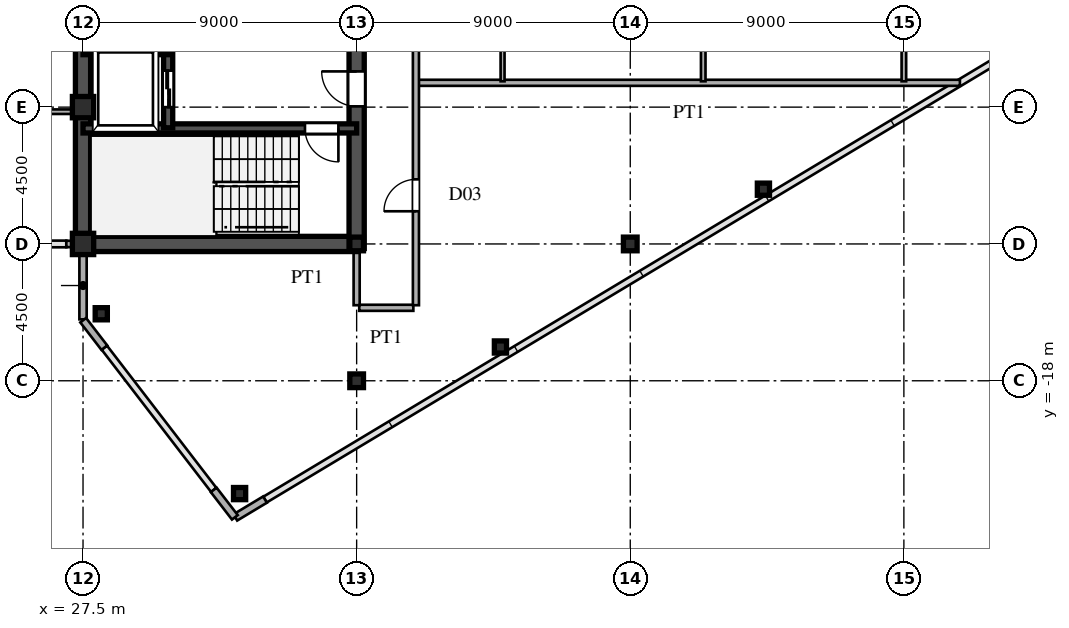
"""IFC4 building model, lengths in metres.
Left out: names, types, materials, properties, quantities, classifications, styles, units other than length and angle.
Written with IfcOpenShell. Run it as: python <this file> out.ifc"""

import sys

from ifc_helpers import new_model, si_unit, direction, frame, frame_2d, origin, origin_2d, place, context, subcontext, project, spatial, rectangle, hollow_rectangle, i_section, extrude, source, transform, mapped, element, fill, save


model = new_model("IFC4")
c1 = context("Model", 3, precision=1e-05, world=origin(), true_north=direction((0.0, 1.0)))
c2 = subcontext(c1, "Body", "Model", "MODEL_VIEW")
j1 = project(units=[si_unit("LENGTHUNIT", "METRE"), si_unit("PLANEANGLEUNIT", "RADIAN")], contexts=[c1])
p1 = place(None, origin())
s1 = spatial("IfcSite", under=j1, at=p1, CompositionType="ELEMENT")
p2 = place(p1, origin())
s2 = spatial("IfcBuilding", under=s1, at=p2, CompositionType="ELEMENT")
p3 = place(p2, frame((0.0, 0.0, 250.65)))
s3 = spatial("IfcBuildingStorey", under=s2, at=p3, CompositionType="ELEMENT", Elevation=250.65)
m1 = source(origin(), c2, "Body", "SweptSolid", [
    extrude(hollow_rectangle(XDim=0.7, YDim=0.7, WallThickness=0.03, at=origin_2d()), origin(), (0.0, 0.0, 1.0), 3.75),
])
for number, where, z_axis, x_axis in (
    (1, (27.5, -13.5, 0.0), (0.0, 0.0, 1.0), (1.0, 0.0, 0.0)),
    (2, (27.5, -9.0, 0.0), (0.0, 0.0, 1.0), (1.0, 0.0, 0.0)),
):
    element("IfcColumn", number, at=place(p3, frame(where, z_axis=z_axis, x_axis=x_axis)), inside=s3, PredefinedType="COLUMN", context=c2, shape_type="MappedRepresentation", body=[
        mapped(m1, transform((0.0, 0.0, 0.0), scale=1.0)),
    ])
m2 = source(origin(), c2, "Body", "SweptSolid", [
    extrude(i_section(OverallWidth=0.45, OverallDepth=0.45, WebThickness=0.016, FlangeThickness=0.025, at=origin_2d()), origin(), (0.0, 0.0, 1.0), 3.75),
])
for number, where, z_axis, x_axis in (
    (3, (36.5, -18.0, 0.0), (0.0, 0.0, 1.0), (1.0, 0.0, 0.0)),
    (4, (36.5, -13.5, 0.0), (0.0, 0.0, 1.0), (1.0, 0.0, 0.0)),
    (5, (45.5, -13.5, 0.0), (0.0, 0.0, 1.0), (1.0, 0.0, 0.0)),
):
    element("IfcColumn", number, at=place(p3, frame(where, z_axis=z_axis, x_axis=x_axis)), inside=s3, PredefinedType="COLUMN", context=c2, shape_type="MappedRepresentation", body=[
        mapped(m2, transform((0.0, 0.0, 0.0), scale=1.0)),
    ])
m3 = source(origin(), c2, "Body", "SweptSolid", [
    extrude(hollow_rectangle(XDim=0.4, YDim=0.4, WallThickness=0.016, at=origin_2d()), origin(), (0.0, 0.0, 1.0), 3.75),
])
for number, where, z_axis, x_axis in (
    (6, (32.65, -21.71, 0.0), (0.0, 0.0, 1.0), (1.0, 0.0, 0.0)),
    (7, (28.1, -15.796, 0.0), (0.0, 0.0, 1.0), (1.0, 0.0, 0.0)),
    (8, (41.23, -16.889, 0.0), (0.0, 0.0, 1.0), (1.0, 0.0, 0.0)),
    (9, (49.88, -11.699, 0.0), (0.0, 0.0, 1.0), (1.0, 0.0, 0.0)),
):
    element("IfcColumn", number, at=place(p3, frame(where, z_axis=z_axis, x_axis=x_axis)), inside=s3, PredefinedType="COLUMN", context=c2, shape_type="MappedRepresentation", body=[
        mapped(m3, transform((0.0, 0.0, 0.0), scale=1.0)),
    ])
p4 = place(p3, frame((32.509, -22.495, 0.0), z_axis=(0.0, 0.0, 1.0), x_axis=(0.85743623509, 0.514590228002, 0.0)))
e10 = element("IfcWall", 10, at=p4, inside=s3, PredefinedType="SOLIDWALL", context=c2, shape_type="SweptSolid", body=[
    extrude(rectangle(XDim=1.14, YDim=0.24, at=frame_2d((0.57, 0.0))), origin(), (0.0, 0.0, 1.0), 3.53),
])
p5 = place(p3, frame((27.5, -15.98, 0.0), z_axis=(0.0, 0.0, 1.0), x_axis=(0.0, 1.0, 0.0)))
e11 = element("IfcWall", 11, at=p5, inside=s3, PredefinedType="SOLIDWALL", context=c2, shape_type="SweptSolid", body=[
    extrude(rectangle(XDim=1.605, YDim=0.24, at=frame_2d((0.803, 0.0))), origin(), (0.0, 0.0, 1.0), 3.53),
])
p6 = place(p3, frame((27.5, -14.375, 0.0), z_axis=(0.0, 0.0, 1.0), x_axis=(0.0, 1.0, 0.0)))
e12 = element("IfcWall", 12, at=p6, inside=s3, PredefinedType="SOLIDWALL", context=c2, shape_type="SweptSolid", body=[
    extrude(rectangle(XDim=0.62, YDim=0.24, at=frame_2d((0.31, 0.0))), origin(), (0.0, 0.0, 1.0), 3.03),
])
for number, where, z_axis, x_axis in (
    (13, (27.506, -16.008, 0.0), (0.0, 0.0, 1.0), (0.61, -0.793, 0.0)),
    (14, (31.799, -21.588, 0.0), (0.0, 0.0, 1.0), (0.61, -0.793, 0.0)),
):
    element("IfcWall", number, at=place(p3, frame(where, z_axis=z_axis, x_axis=x_axis)), inside=s3, PredefinedType="SOLIDWALL", context=c2, shape_type="SweptSolid", body=[
        extrude(rectangle(XDim=1.14, YDim=0.24, at=frame_2d((0.57, 0.0))), origin(), (0.0, 0.0, 1.0), 3.53),
    ])
p7 = place(p3, frame((26.95, -13.5, 0.0), z_axis=(0.0, 0.0, 1.0), x_axis=(1.0, 0.0, 0.0)))
e15 = element("IfcWall", 15, at=p7, inside=s3, PredefinedType="SOLIDWALL", context=c2, shape_type="SweptSolid", body=[
    extrude(rectangle(XDim=0.54, YDim=0.21, at=frame_2d((0.27, 0.0))), origin(), (0.0, 0.0, 1.0), 3.03),
])
p8 = place(p3, frame((27.5, -13.5, 0.0), z_axis=(0.0, 0.0, 1.0), x_axis=(0.0, 1.0, 0.0)))
e16 = element("IfcWall", 16, at=p8, inside=s3, PredefinedType="SHEAR", context=c2, shape_type="SweptSolid", body=[
    extrude(rectangle(XDim=12.2, YDim=0.5, at=frame_2d((6.1, 0.0))), origin(), (0.0, 0.0, 1.0), 3.53),
])
p9 = place(p3, frame((27.5, -13.5, 0.0), z_axis=(0.0, 0.0, 1.0), x_axis=(1.0, 0.0, 0.0)))
e17 = element("IfcWall", 17, at=p9, inside=s3, PredefinedType="SHEAR", context=c2, shape_type="SweptSolid", body=[
    extrude(rectangle(XDim=9.0, YDim=0.5, at=frame_2d((4.5, 0.0))), origin(), (0.0, 0.0, 1.0), 3.53),
])
p10 = place(p3, frame((36.5, -13.65, 0.0), z_axis=(0.0, 0.0, 1.0), x_axis=(0.0, 1.0, 0.0)))
e18 = element("IfcWall", 18, at=p10, inside=s3, PredefinedType="SHEAR", context=c2, shape_type="SweptSolid", body=[
    extrude(rectangle(XDim=7.15, YDim=0.5, at=frame_2d((3.575, 0.0))), origin(), (0.0, 0.0, 1.0), 3.53),
])
p11 = place(p10, frame((4.675, 0.0, 0.0)))
e19 = element("IfcOpeningElement", 19, at=p11, cuts=e18, PredefinedType="OPENING", context=c2, shape_type="SweptSolid", body=[
    extrude(rectangle(XDim=1.15, YDim=2.2, at=frame_2d((0.575, 1.1))), frame((0.0, 0.26, 0.0), z_axis=(0.0, -1.0, 0.0), x_axis=(1.0, 0.0, 0.0)), (0.0, 0.0, 1.0), 0.52),
])
p12 = place(p3, frame((27.5, -9.7, 0.0), z_axis=(0.0, 0.0, 1.0), x_axis=(1.0, 0.0, 0.0)))
e20 = element("IfcWall", 20, at=p12, inside=s3, PredefinedType="SHEAR", context=c2, shape_type="SweptSolid", body=[
    extrude(rectangle(XDim=9.0, YDim=0.3, at=frame_2d((4.5, 0.0))), origin(), (0.0, 0.0, 1.0), 3.53),
])
p13 = place(p12, frame((7.3, 0.0, 0.0)))
e21 = element("IfcOpeningElement", 21, at=p13, cuts=e20, PredefinedType="OPENING", context=c2, shape_type="SweptSolid", body=[
    extrude(rectangle(XDim=1.1, YDim=2.2, at=frame_2d((0.55, 1.1))), frame((0.0, 0.16, 0.0), z_axis=(0.0, -1.0, 0.0), x_axis=(1.0, 0.0, 0.0)), (0.0, 0.0, 1.0), 0.32),
])
p14 = place(p3, frame((27.5, -7.15, 0.0), z_axis=(0.0, 0.0, 1.0), x_axis=(1.0, 0.0, 0.0)))
e22 = element("IfcWall", 22, at=p14, inside=s3, PredefinedType="SHEAR", context=c2, shape_type="SweptSolid", body=[
    extrude(rectangle(XDim=2.8, YDim=0.25, at=frame_2d((1.4, 0.0))), origin(), (0.0, 0.0, 1.0), 3.53),
])
p15 = place(p3, frame((30.3, -9.68, 0.0), z_axis=(0.0, 0.0, 1.0), x_axis=(0.0, 1.0, 0.0)))
e23 = element("IfcWall", 23, at=p15, inside=s3, PredefinedType="SHEAR", context=c2, shape_type="SweptSolid", body=[
    extrude(rectangle(XDim=2.56, YDim=0.3, at=frame_2d((1.28, 0.0))), origin(), (0.0, 0.0, 1.0), 3.53),
])
p16 = place(p15, frame((0.68, 0.0, 0.0)))
e24 = element("IfcOpeningElement", 24, at=p16, cuts=e23, PredefinedType="OPENING", context=c2, shape_type="SweptSolid", body=[
    extrude(rectangle(XDim=1.2, YDim=2.25, at=frame_2d((0.6, 1.125))), frame((0.0, 0.16, 0.0), z_axis=(0.0, -1.0, 0.0), x_axis=(1.0, 0.0, 0.0)), (0.0, 0.0, 1.0), 0.32),
])
p17 = place(p3, frame((36.585, -15.6, 0.0), z_axis=(0.0, 0.0, 1.0), x_axis=(1.0, 0.0, 0.0)))
e25 = element("IfcWall", 25, at=p17, inside=s3, PredefinedType="PARTITIONING", context=c2, shape_type="SweptSolid", body=[
    extrude(rectangle(XDim=1.78, YDim=0.2, at=frame_2d((0.89, 0.0))), origin(), (0.0, 0.0, 1.0), 3.53),
])
p18 = place(p3, frame((7.085, -9.15, 0.0), z_axis=(0.0, 0.0, 1.0), x_axis=(1.0, 0.0, 0.0)))
e26 = element("IfcWall", 26, at=p18, inside=s3, PredefinedType="PARTITIONING", context=c2, shape_type="SweptSolid", body=[
    extrude(rectangle(XDim=20.16, YDim=0.15, at=frame_2d((10.08, 0.0))), origin(), (0.0, 0.0, 1.0), 3.53),
])
p19 = place(p18, frame((3.44, 0.0, 0.0)))
e27 = element("IfcOpeningElement", 27, at=p19, cuts=e26, PredefinedType="OPENING", context=c2, shape_type="SweptSolid", body=[
    extrude(rectangle(XDim=0.95, YDim=2.15, at=frame_2d((0.475, 1.075))), frame((0.0, 0.085, 0.0), z_axis=(0.0, -1.0, 0.0), x_axis=(1.0, 0.0, 0.0)), (0.0, 0.0, 1.0), 0.17),
])
p20 = place(p18, frame((10.69, 0.0, 0.0)))
e28 = element("IfcOpeningElement", 28, at=p20, cuts=e26, PredefinedType="OPENING", context=c2, shape_type="SweptSolid", body=[
    extrude(rectangle(XDim=0.95, YDim=2.15, at=frame_2d((0.475, 1.075))), frame((0.0, 0.085, 0.0), z_axis=(0.0, -1.0, 0.0), x_axis=(1.0, 0.0, 0.0)), (0.0, 0.0, 1.0), 0.17),
])
p21 = place(p18, frame((16.94, 0.0, 0.0)))
e29 = element("IfcOpeningElement", 29, at=p21, cuts=e26, PredefinedType="OPENING", context=c2, shape_type="SweptSolid", body=[
    extrude(rectangle(XDim=0.95, YDim=2.15, at=frame_2d((0.475, 1.075))), frame((0.0, 0.085, 0.0), z_axis=(0.0, -1.0, 0.0), x_axis=(1.0, 0.0, 0.0)), (0.0, 0.0, 1.0), 0.17),
])
p22 = place(p3, frame((38.53, -8.2, 0.0), z_axis=(0.0, 0.0, 1.0), x_axis=(1.0, 0.0, 0.0)))
e30 = element("IfcWall", 30, at=p22, inside=s3, PredefinedType="PARTITIONING", context=c2, shape_type="SweptSolid", body=[
    extrude(rectangle(XDim=17.813, YDim=0.2, at=frame_2d((8.906, 0.0))), origin(), (0.0, 0.0, 1.0), 3.53),
])
p23 = place(p3, frame((36.5, -15.515, 0.0), z_axis=(0.0, 0.0, 1.0), x_axis=(0.0, 1.0, 0.0)))
e31 = element("IfcWall", 31, at=p23, inside=s3, PredefinedType="PARTITIONING", context=c2, shape_type="SweptSolid", body=[
    extrude(rectangle(XDim=1.76, YDim=0.2, at=frame_2d((0.88, 0.0))), origin(), (0.0, 0.0, 1.0), 2.93),
])
p24 = place(p3, frame((38.45, -15.515, 0.0), z_axis=(0.0, 0.0, 1.0), x_axis=(0.0, 1.0, 0.0)))
e32 = element("IfcWall", 32, at=p24, inside=s3, PredefinedType="PARTITIONING", context=c2, shape_type="SweptSolid", body=[
    extrude(rectangle(XDim=31.03, YDim=0.2, at=frame_2d((15.515, 0.0))), origin(), (0.0, 0.0, 1.0), 3.53),
])
p25 = place(p24, frame((3.09, 0.0, 0.0)))
e33 = element("IfcOpeningElement", 33, at=p25, cuts=e32, PredefinedType="OPENING", context=c2, shape_type="SweptSolid", body=[
    extrude(rectangle(XDim=1.05, YDim=2.25, at=frame_2d((0.525, 1.125))), frame((0.0, 0.11, 0.0), z_axis=(0.0, -1.0, 0.0), x_axis=(1.0, 0.0, 0.0)), (0.0, 0.0, 1.0), 0.22),
])
p26 = place(p24, frame((13.095, 0.0, 0.0)))
e34 = element("IfcOpeningElement", 34, at=p26, cuts=e32, PredefinedType="OPENING", context=c2, shape_type="SweptSolid", body=[
    extrude(rectangle(XDim=1.05, YDim=2.25, at=frame_2d((0.525, 1.125))), frame((0.0, 0.11, 0.0), z_axis=(0.0, -1.0, 0.0), x_axis=(1.0, 0.0, 0.0)), (0.0, 0.0, 1.0), 0.22),
])
p27 = place(p24, frame((25.19, 0.0, 0.0)))
e35 = element("IfcOpeningElement", 35, at=p27, cuts=e32, PredefinedType="OPENING", context=c2, shape_type="SweptSolid", body=[
    extrude(rectangle(XDim=1.05, YDim=2.25, at=frame_2d((0.525, 1.125))), frame((0.0, 0.11, 0.0), z_axis=(0.0, -1.0, 0.0), x_axis=(1.0, 0.0, 0.0)), (0.0, 0.0, 1.0), 0.22),
])
p28 = place(p3, frame((41.3, -8.15, 0.0), z_axis=(0.0, 0.0, 1.0), x_axis=(0.0, 1.0, 0.0)))
e36 = element("IfcWall", 36, at=p28, inside=s3, PredefinedType="PARTITIONING", context=c2, shape_type="SweptSolid", body=[
    extrude(rectangle(XDim=3.408, YDim=0.13, at=frame_2d((1.704, 0.0))), origin(), (0.0, 0.0, 1.0), 3.53),
])
p29 = place(p3, frame((47.9, -8.15, 0.0), z_axis=(0.0, 0.0, 1.0), x_axis=(0.0, 1.0, 0.0)))
e37 = element("IfcWall", 37, at=p29, inside=s3, PredefinedType="PARTITIONING", context=c2, shape_type="SweptSolid", body=[
    extrude(rectangle(XDim=12.9, YDim=0.15, at=frame_2d((6.45, 0.0))), origin(), (0.0, 0.0, 1.0), 3.53),
])
p30 = place(p29, frame((5.975, 0.0, 0.0)))
e38 = element("IfcOpeningElement", 38, at=p30, cuts=e37, PredefinedType="OPENING", context=c2, shape_type="SweptSolid", body=[
    extrude(rectangle(XDim=0.95, YDim=2.15, at=frame_2d((0.475, 1.075))), frame((0.0, 0.085, 0.0), z_axis=(0.0, -1.0, 0.0), x_axis=(1.0, 0.0, 0.0)), (0.0, 0.0, 1.0), 0.17),
])
p31 = place(p29, frame((1.642, 0.0, 0.0)))
e39 = element("IfcOpeningElement", 39, at=p31, cuts=e37, PredefinedType="OPENING", context=c2, shape_type="SweptSolid", body=[
    extrude(rectangle(XDim=0.95, YDim=2.15, at=frame_2d((0.475, 1.075))), frame((0.0, 0.085, 0.0), z_axis=(0.0, -1.0, 0.0), x_axis=(1.0, 0.0, 0.0)), (0.0, 0.0, 1.0), 0.17),
])
p32 = place(p3, frame((54.5, -8.15, 0.0), z_axis=(0.0, 0.0, 1.0), x_axis=(0.0, 1.0, 0.0)))
e40 = element("IfcWall", 40, at=p32, inside=s3, PredefinedType="PARTITIONING", context=c2, shape_type="SweptSolid", body=[
    extrude(rectangle(XDim=12.9, YDim=0.15, at=frame_2d((6.45, 0.0))), origin(), (0.0, 0.0, 1.0), 2.93),
])
p33 = place(p32, frame((5.975, 0.0, 0.0)))
e41 = element("IfcOpeningElement", 41, at=p33, cuts=e40, PredefinedType="OPENING", context=c2, shape_type="SweptSolid", body=[
    extrude(rectangle(XDim=0.95, YDim=2.15, at=frame_2d((0.475, 1.075))), frame((0.0, 0.085, 0.0), z_axis=(0.0, -1.0, 0.0), x_axis=(1.0, 0.0, 0.0)), (0.0, 0.0, 1.0), 0.17),
])
p34 = place(p32, frame((1.642, 0.0, 0.0)))
e42 = element("IfcOpeningElement", 42, at=p34, cuts=e40, PredefinedType="OPENING", context=c2, shape_type="SweptSolid", body=[
    extrude(rectangle(XDim=0.95, YDim=2.15, at=frame_2d((0.475, 1.075))), frame((0.0, 0.085, 0.0), z_axis=(0.0, -1.0, 0.0), x_axis=(1.0, 0.0, 0.0)), (0.0, 0.0, 1.0), 0.17),
])
p35 = place(p32, frame((10.308, 0.0, 0.0)))
e43 = element("IfcOpeningElement", 43, at=p35, cuts=e40, PredefinedType="OPENING", context=c2, shape_type="SweptSolid", body=[
    extrude(rectangle(XDim=0.95, YDim=2.15, at=frame_2d((0.475, 1.075))), frame((0.0, 0.085, 0.0), z_axis=(0.0, -1.0, 0.0), x_axis=(1.0, 0.0, 0.0)), (0.0, 0.0, 1.0), 0.17),
])
m4 = source(origin(), c2, "Body", "SweptSolid", [
    extrude(rectangle(XDim=1.15, YDim=2.2, at=frame_2d((0.575, 1.1))), frame((0.0, 0.025, 0.0), z_axis=(0.0, -1.0, 0.0), x_axis=(1.0, 0.0, 0.0)), (0.0, 0.0, 1.0), 0.05),
])
p36 = place(p11, origin())
e44 = element("IfcDoor", 44, at=p36, inside=s3, OperationType="SINGLE_SWING_RIGHT", PredefinedType="DOOR", context=c2, shape_type="MappedRepresentation", body=[
    mapped(m4, transform((0.0, 0.0, 0.0), scale=1.0)),
])
fill(e19, e44)
m5 = source(origin(), c2, "Body", "SweptSolid", [
    extrude(rectangle(XDim=1.1, YDim=2.2, at=frame_2d((0.55, 1.1))), frame((0.0, 0.025, 0.0), z_axis=(0.0, -1.0, 0.0), x_axis=(1.0, 0.0, 0.0)), (0.0, 0.0, 1.0), 0.05),
])
p37 = place(p13, frame((1.1, 0.0, 0.0), z_axis=(0.0, 0.0, 1.0), x_axis=(-1.0, 0.0, 0.0)))
e45 = element("IfcDoor", 45, at=p37, inside=s3, OperationType="SINGLE_SWING_RIGHT", PredefinedType="DOOR", context=c2, shape_type="MappedRepresentation", body=[
    mapped(m5, transform((0.0, 0.0, 0.0), scale=1.0)),
])
fill(e21, e45)
m6 = source(origin(), c2, "Body", "SweptSolid", [
    extrude(rectangle(XDim=1.2, YDim=2.25, at=frame_2d((0.6, 1.125))), frame((0.0, 0.025, 0.0), z_axis=(0.0, -1.0, 0.0), x_axis=(1.0, 0.0, 0.0)), (0.0, 0.0, 1.0), 0.05),
])
p38 = place(p16, origin())
e46 = element("IfcDoor", 46, at=p38, inside=s3, OperationType="DOUBLE_DOOR_SLIDING", PredefinedType="DOOR", context=c2, shape_type="MappedRepresentation", body=[
    mapped(m6, transform((0.0, 0.0, 0.0), scale=1.0)),
])
fill(e24, e46)
m7 = source(origin(), c2, "Body", "SweptSolid", [
    extrude(rectangle(XDim=1.05, YDim=2.25, at=frame_2d((0.525, 1.125))), frame((0.0, 0.025, 0.0), z_axis=(0.0, -1.0, 0.0), x_axis=(1.0, 0.0, 0.0)), (0.0, 0.0, 1.0), 0.05),
])
p39 = place(p25, origin())
e47 = element("IfcDoor", 47, at=p39, inside=s3, OperationType="SINGLE_SWING_LEFT", PredefinedType="DOOR", context=c2, shape_type="MappedRepresentation", body=[
    mapped(m7, transform((0.0, 0.0, 0.0), scale=1.0)),
])
fill(e33, e47)
save(model, sys.argv[1])
